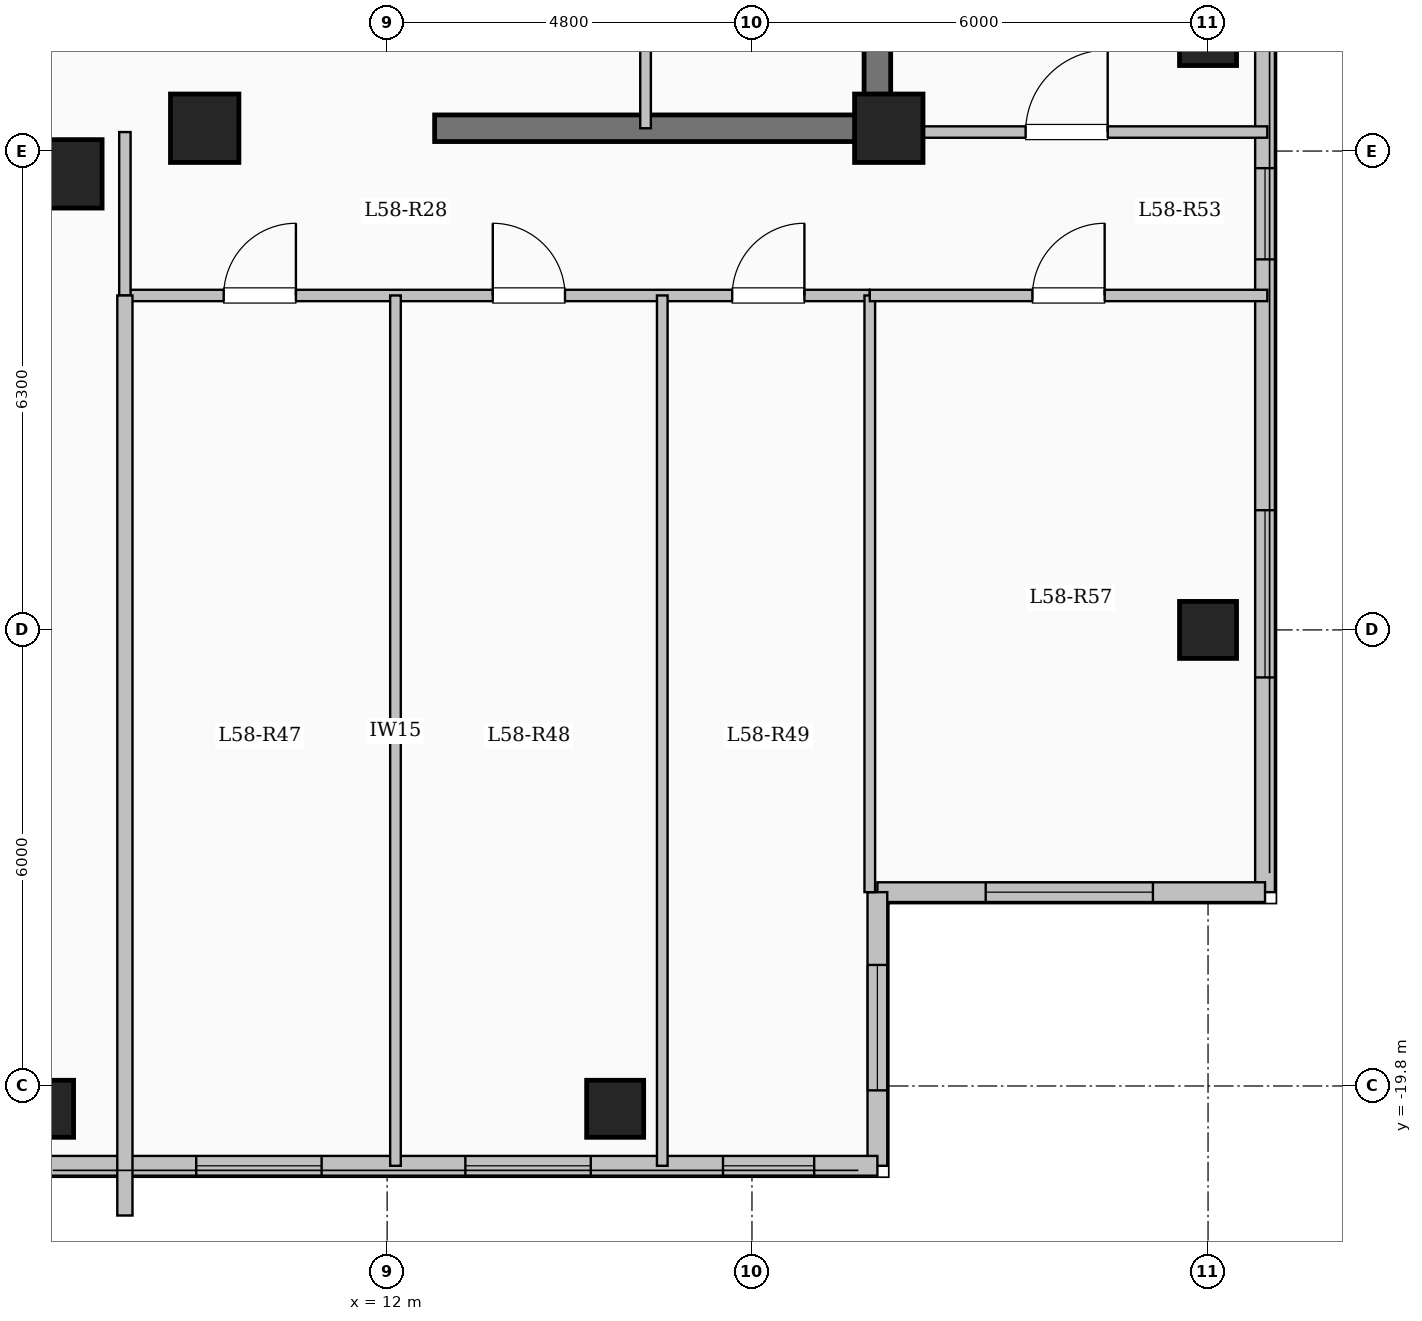
"""IFC4 building model, lengths in metres.
Left out: names, types, materials, properties, quantities, classifications, styles, units other than length and angle.
Written with IfcOpenShell. Run it as: python <this file> out.ifc"""

import sys

from ifc_helpers import new_model, si_unit, direction, frame, frame_2d, origin, origin_2d, place, context, subcontext, project, spatial, rectangle, extrude, element, fill, save


model = new_model("IFC4")
c1 = context("Model", 3, precision=1e-05, world=origin(), true_north=direction((0.0, 1.0)))
c2 = subcontext(c1, "Body", "Model", "MODEL_VIEW")
j1 = project(units=[si_unit("LENGTHUNIT", "METRE"), si_unit("PLANEANGLEUNIT", "RADIAN")], contexts=[c1])
p1 = place(None, origin())
s1 = spatial("IfcSite", under=j1, at=p1, CompositionType="ELEMENT")
p2 = place(p1, origin())
s2 = spatial("IfcBuilding", under=s1, at=p2, CompositionType="ELEMENT")
p3 = place(p2, frame((0.0, 0.0, 213.7)))
s3 = spatial("IfcBuildingStorey", under=s2, at=p3, CompositionType="ELEMENT", Elevation=213.7)
for number, where, z_axis, x_axis in (
    (1, (7.8, -7.8, 0.0), (0.0, 0.0, 1.0), (1.0, 0.0, 0.0)),
    (2, (9.6, -7.2, 0.0), (0.0, 0.0, 1.0), (1.0, 0.0, 0.0)),
    (3, (18.6, -7.2, 0.0), (0.0, 0.0, 1.0), (1.0, 0.0, 0.0)),
):
    element("IfcColumn", number, at=place(p3, frame(where, z_axis=z_axis, x_axis=x_axis)), inside=s3, PredefinedType="COLUMN", context=c2, shape_type="SweptSolid", body=[
        extrude(rectangle(XDim=0.9, YDim=0.9, at=origin_2d()), origin(), (0.0, 0.0, 1.0), 3.35),
    ])
for number, where, z_axis, x_axis in (
    (4, (7.5, -20.1, 0.0), (0.0, 0.0, 1.0), (1.0, 0.0, 0.0)),
    (5, (15.0, -20.1, 0.0), (0.0, 0.0, 1.0), (1.0, 0.0, 0.0)),
    (6, (22.8, -13.8, 0.0), (0.0, 0.0, 1.0), (1.0, 0.0, 0.0)),
    (7, (22.8, -6.0, 0.0), (0.0, 0.0, 1.0), (1.0, 0.0, 0.0)),
):
    element("IfcColumn", number, at=place(p3, frame(where, z_axis=z_axis, x_axis=x_axis)), inside=s3, PredefinedType="COLUMN", context=c2, shape_type="SweptSolid", body=[
        extrude(rectangle(XDim=0.75, YDim=0.75, at=origin_2d()), origin(), (0.0, 0.0, 1.0), 3.35),
    ])
p4 = place(p3, frame((23.55, 17.25, 0.0), z_axis=(0.0, 0.0, 1.0), x_axis=(0.0, -1.0, 0.0)))
e8 = element("IfcWall", 8, at=p4, inside=s3, PredefinedType="SOLIDWALL", context=c2, shape_type="SweptSolid", body=[
    extrude(rectangle(XDim=34.5, YDim=0.26, at=frame_2d((17.25, 0.0))), origin(), (0.0, 0.0, 1.0), 3.1),
])
p5 = place(p4, frame((1.375, 0.0, 0.9)))
e9 = element("IfcOpeningElement", 9, at=p5, cuts=e8, PredefinedType="OPENING", context=c2, shape_type="SweptSolid", body=[
    extrude(rectangle(XDim=2.0, YDim=1.7, at=frame_2d((1.0, 0.85))), frame((0.0, 0.14, 0.0), z_axis=(0.0, -1.0, 0.0), x_axis=(1.0, 0.0, 0.0)), (0.0, 0.0, 1.0), 0.28),
])
p6 = place(p4, frame((5.125, 0.0, 0.95)))
e10 = element("IfcOpeningElement", 10, at=p6, cuts=e8, PredefinedType="OPENING", context=c2, shape_type="SweptSolid", body=[
    extrude(rectangle(XDim=1.0, YDim=1.5, at=frame_2d((0.5, 0.75))), frame((0.0, 0.14, 0.0), z_axis=(0.0, -1.0, 0.0), x_axis=(1.0, 0.0, 0.0)), (0.0, 0.0, 1.0), 0.28),
])
p7 = place(p4, frame((14.5, 0.0, 0.9)))
e11 = element("IfcOpeningElement", 11, at=p7, cuts=e8, PredefinedType="OPENING", context=c2, shape_type="SweptSolid", body=[
    extrude(rectangle(XDim=2.0, YDim=1.7, at=frame_2d((1.0, 0.85))), frame((0.0, 0.14, 0.0), z_axis=(0.0, -1.0, 0.0), x_axis=(1.0, 0.0, 0.0)), (0.0, 0.0, 1.0), 0.28),
])
p8 = place(p4, frame((24.975, 0.0, 0.95)))
e12 = element("IfcOpeningElement", 12, at=p8, cuts=e8, PredefinedType="OPENING", context=c2, shape_type="SweptSolid", body=[
    extrude(rectangle(XDim=1.2, YDim=1.5, at=frame_2d((0.6, 0.75))), frame((0.0, 0.14, 0.0), z_axis=(0.0, -1.0, 0.0), x_axis=(1.0, 0.0, 0.0)), (0.0, 0.0, 1.0), 0.28),
])
p9 = place(p4, frame((29.475, 0.0, 0.9)))
e13 = element("IfcOpeningElement", 13, at=p9, cuts=e8, PredefinedType="OPENING", context=c2, shape_type="SweptSolid", body=[
    extrude(rectangle(XDim=2.2, YDim=1.75, at=frame_2d((1.1, 0.875))), frame((0.0, 0.14, 0.0), z_axis=(0.0, -1.0, 0.0), x_axis=(1.0, 0.0, 0.0)), (0.0, 0.0, 1.0), 0.28),
])
p10 = place(p3, frame((23.55, -17.25, 0.0), z_axis=(0.0, 0.0, 1.0), x_axis=(-1.0, 0.0, 0.0)))
e14 = element("IfcWall", 14, at=p10, inside=s3, PredefinedType="SOLIDWALL", context=c2, shape_type="SweptSolid", body=[
    extrude(rectangle(XDim=5.1, YDim=0.26, at=frame_2d((2.55, 0.0))), origin(), (0.0, 0.0, 1.0), 3.1),
])
p11 = place(p10, frame((1.475, 0.0, 0.9)))
e15 = element("IfcOpeningElement", 15, at=p11, cuts=e14, PredefinedType="OPENING", context=c2, shape_type="SweptSolid", body=[
    extrude(rectangle(XDim=2.2, YDim=1.75, at=frame_2d((1.1, 0.875))), frame((0.0, 0.14, 0.0), z_axis=(0.0, -1.0, 0.0), x_axis=(1.0, 0.0, 0.0)), (0.0, 0.0, 1.0), 0.28),
])
p12 = place(p3, frame((18.45, -17.25, 0.0), z_axis=(0.0, 0.0, 1.0), x_axis=(0.0, -1.0, 0.0)))
e16 = element("IfcWall", 16, at=p12, inside=s3, PredefinedType="SOLIDWALL", context=c2, shape_type="SweptSolid", body=[
    extrude(rectangle(XDim=3.6, YDim=0.26, at=frame_2d((1.8, 0.0))), origin(), (0.0, 0.0, 1.0), 3.1),
])
p13 = place(p12, frame((0.958, 0.0, 0.9)))
e17 = element("IfcOpeningElement", 17, at=p13, cuts=e16, PredefinedType="OPENING", context=c2, shape_type="SweptSolid", body=[
    extrude(rectangle(XDim=1.65, YDim=1.6, at=frame_2d((0.825, 0.8))), frame((0.0, 0.14, 0.0), z_axis=(0.0, -1.0, 0.0), x_axis=(1.0, 0.0, 0.0)), (0.0, 0.0, 1.0), 0.28),
])
p14 = place(p3, frame((18.45, -20.85, 0.0), z_axis=(0.0, 0.0, 1.0), x_axis=(-1.0, 0.0, 0.0)))
e18 = element("IfcWall", 18, at=p14, inside=s3, PredefinedType="SOLIDWALL", context=c2, shape_type="SweptSolid", body=[
    extrude(rectangle(XDim=11.1, YDim=0.26, at=frame_2d((5.55, 0.0))), origin(), (0.0, 0.0, 1.0), 3.1),
])
p15 = place(p14, frame((0.831, 0.0, 0.95)))
e19 = element("IfcOpeningElement", 19, at=p15, cuts=e18, PredefinedType="OPENING", context=c2, shape_type="SweptSolid", body=[
    extrude(rectangle(XDim=1.2, YDim=1.5, at=frame_2d((0.6, 0.75))), frame((0.0, 0.14, 0.0), z_axis=(0.0, -1.0, 0.0), x_axis=(1.0, 0.0, 0.0)), (0.0, 0.0, 1.0), 0.28),
])
p16 = place(p14, frame((3.771, 0.0, 0.9)))
e20 = element("IfcOpeningElement", 20, at=p16, cuts=e18, PredefinedType="OPENING", context=c2, shape_type="SweptSolid", body=[
    extrude(rectangle(XDim=1.65, YDim=1.6, at=frame_2d((0.825, 0.8))), frame((0.0, 0.14, 0.0), z_axis=(0.0, -1.0, 0.0), x_axis=(1.0, 0.0, 0.0)), (0.0, 0.0, 1.0), 0.28),
])
p17 = place(p14, frame((7.312, 0.0, 0.9)))
e21 = element("IfcOpeningElement", 21, at=p17, cuts=e18, PredefinedType="OPENING", context=c2, shape_type="SweptSolid", body=[
    extrude(rectangle(XDim=1.65, YDim=1.6, at=frame_2d((0.825, 0.8))), frame((0.0, 0.14, 0.0), z_axis=(0.0, -1.0, 0.0), x_axis=(1.0, 0.0, 0.0)), (0.0, 0.0, 1.0), 0.28),
])
p18 = place(p3, frame((18.45, -7.375, 0.0), z_axis=(0.0, 0.0, 1.0), x_axis=(0.0, 1.0, 0.0)))
e22 = element("IfcWall", 22, at=p18, inside=s3, PredefinedType="SHEAR", context=c2, shape_type="SweptSolid", body=[
    extrude(rectangle(XDim=14.05, YDim=0.35, at=frame_2d((7.025, 0.0))), origin(), (0.0, 0.0, 1.0), 3.35),
])
p19 = place(p3, frame((12.625, -7.2, 0.0), z_axis=(0.0, 0.0, 1.0), x_axis=(1.0, 0.0, 0.0)))
e23 = element("IfcWall", 23, at=p19, inside=s3, PredefinedType="SHEAR", context=c2, shape_type="SweptSolid", body=[
    extrude(rectangle(XDim=6.0, YDim=0.35, at=frame_2d((3.0, 0.0))), origin(), (0.0, 0.0, 1.0), 3.35),
])
p20 = place(p3, frame((15.4, -7.2, 0.0), z_axis=(0.0, 0.0, 1.0), x_axis=(0.0, 1.0, 0.0)))
e24 = element("IfcWall", 24, at=p20, inside=s3, PredefinedType="PARTITIONING", context=c2, shape_type="SweptSolid", body=[
    extrude(rectangle(XDim=10.45, YDim=0.14, at=frame_2d((5.225, 0.0))), origin(), (0.0, 0.0, 1.0), 3.1),
])
p21 = place(p20, frame((9.25, 0.0, 0.0)))
e25 = element("IfcOpeningElement", 25, at=p21, cuts=e24, PredefinedType="OPENING", context=c2, shape_type="SweptSolid", body=[
    extrude(rectangle(XDim=0.9, YDim=2.08, at=frame_2d((0.45, 1.04))), frame((0.0, 0.08, 0.0), z_axis=(0.0, -1.0, 0.0), x_axis=(1.0, 0.0, 0.0)), (0.0, 0.0, 1.0), 0.16),
])
p22 = place(p3, frame((8.55, -9.4, 0.0), z_axis=(0.0, 0.0, 1.0), x_axis=(1.0, 0.0, 0.0)))
e26 = element("IfcWall", 26, at=p22, inside=s3, PredefinedType="PARTITIONING", context=c2, shape_type="SweptSolid", body=[
    extrude(rectangle(XDim=9.8, YDim=0.15, at=frame_2d((4.9, 0.0))), origin(), (0.0, 0.0, 1.0), 3.1),
])
p23 = place(p22, frame((1.3, 0.0, 0.0)))
e27 = element("IfcOpeningElement", 27, at=p23, cuts=e26, PredefinedType="OPENING", context=c2, shape_type="SweptSolid", body=[
    extrude(rectangle(XDim=0.95, YDim=2.15, at=frame_2d((0.475, 1.075))), frame((0.0, 0.085, 0.0), z_axis=(0.0, -1.0, 0.0), x_axis=(1.0, 0.0, 0.0)), (0.0, 0.0, 1.0), 0.17),
])
p24 = place(p22, frame((4.84, 0.0, 0.0)))
e28 = element("IfcOpeningElement", 28, at=p24, cuts=e26, PredefinedType="OPENING", context=c2, shape_type="SweptSolid", body=[
    extrude(rectangle(XDim=0.95, YDim=2.15, at=frame_2d((0.475, 1.075))), frame((0.0, 0.085, 0.0), z_axis=(0.0, -1.0, 0.0), x_axis=(1.0, 0.0, 0.0)), (0.0, 0.0, 1.0), 0.17),
])
p25 = place(p22, frame((7.99, 0.0, 0.0)))
e29 = element("IfcOpeningElement", 29, at=p25, cuts=e26, PredefinedType="OPENING", context=c2, shape_type="SweptSolid", body=[
    extrude(rectangle(XDim=0.95, YDim=2.15, at=frame_2d((0.475, 1.075))), frame((0.0, 0.085, 0.0), z_axis=(0.0, -1.0, 0.0), x_axis=(1.0, 0.0, 0.0)), (0.0, 0.0, 1.0), 0.17),
])
p26 = place(p3, frame((8.55, -9.4, 0.0), z_axis=(0.0, 0.0, 1.0), x_axis=(0.0, 1.0, 0.0)))
e30 = element("IfcWall", 30, at=p26, inside=s3, PredefinedType="PARTITIONING", context=c2, shape_type="SweptSolid", body=[
    extrude(rectangle(XDim=2.15, YDim=0.15, at=frame_2d((1.075, 0.0))), origin(), (0.0, 0.0, 1.0), 3.1),
])
for number, where, z_axis, x_axis in (
    (31, (12.11, -20.85, 0.0), (0.0, 0.0, 1.0), (0.0, 1.0, 0.0)),
    (32, (15.62, -20.85, 0.0), (0.0, 0.0, 1.0), (0.0, 1.0, 0.0)),
):
    element("IfcWall", number, at=place(p3, frame(where, z_axis=z_axis, x_axis=x_axis)), inside=s3, PredefinedType="PARTITIONING", context=c2, shape_type="SweptSolid", body=[
        extrude(rectangle(XDim=11.45, YDim=0.14, at=frame_2d((5.725, 0.0))), origin(), (0.0, 0.0, 1.0), 3.1),
    ])
p27 = place(p3, frame((8.55, -21.504, 0.0), z_axis=(0.0, 0.0, 1.0), x_axis=(0.0, 1.0, 0.0)))
e33 = element("IfcWall", 33, at=p27, inside=s3, PredefinedType="SOLIDWALL", context=c2, shape_type="SweptSolid", body=[
    extrude(rectangle(XDim=12.104, YDim=0.2, at=frame_2d((6.052, 0.0))), origin(), (0.0, 0.0, 1.0), 3.1),
])
p28 = place(p3, frame((18.45, -7.25, 0.0), z_axis=(0.0, 0.0, 1.0), x_axis=(1.0, 0.0, 0.0)))
e34 = element("IfcWall", 34, at=p28, inside=s3, PredefinedType="PARTITIONING", context=c2, shape_type="SweptSolid", body=[
    extrude(rectangle(XDim=5.13, YDim=0.15, at=frame_2d((2.565, 0.0))), origin(), (0.0, 0.0, 1.0), 3.1),
])
p29 = place(p28, frame((1.95, 0.0, 0.0)))
e35 = element("IfcOpeningElement", 35, at=p29, cuts=e34, PredefinedType="OPENING", context=c2, shape_type="SweptSolid", body=[
    extrude(rectangle(XDim=1.08, YDim=2.15, at=frame_2d((0.54, 1.075))), frame((0.0, 0.085, 0.0), z_axis=(0.0, -1.0, 0.0), x_axis=(1.0, 0.0, 0.0)), (0.0, 0.0, 1.0), 0.17),
])
p30 = place(p3, frame((18.35, -17.25, 0.0), z_axis=(0.0, 0.0, 1.0), x_axis=(0.0, 1.0, 0.0)))
e36 = element("IfcWall", 36, at=p30, inside=s3, PredefinedType="PARTITIONING", context=c2, shape_type="SweptSolid", body=[
    extrude(rectangle(XDim=7.85, YDim=0.14, at=frame_2d((3.925, 0.0))), origin(), (0.0, 0.0, 1.0), 3.1),
])
p31 = place(p3, frame((18.35, -9.4, 0.0), z_axis=(0.0, 0.0, 1.0), x_axis=(1.0, 0.0, 0.0)))
e37 = element("IfcWall", 37, at=p31, inside=s3, PredefinedType="PARTITIONING", context=c2, shape_type="SweptSolid", body=[
    extrude(rectangle(XDim=5.23, YDim=0.15, at=frame_2d((2.615, 0.0))), origin(), (0.0, 0.0, 1.0), 3.1),
])
p32 = place(p31, frame((2.14, 0.0, 0.0)))
e38 = element("IfcOpeningElement", 38, at=p32, cuts=e37, PredefinedType="OPENING", context=c2, shape_type="SweptSolid", body=[
    extrude(rectangle(XDim=0.95, YDim=2.15, at=frame_2d((0.475, 1.075))), frame((0.0, 0.085, 0.0), z_axis=(0.0, -1.0, 0.0), x_axis=(1.0, 0.0, 0.0)), (0.0, 0.0, 1.0), 0.17),
])
p33 = place(p8, origin())
e39 = element("IfcWindow", 39, at=p33, inside=s3, PartitioningType="SINGLE_PANEL", PredefinedType="WINDOW", context=c2, shape_type="SweptSolid", body=[
    extrude(rectangle(XDim=1.2, YDim=1.5, at=frame_2d((0.6, 0.75))), frame((0.0, 0.03, 0.0), z_axis=(0.0, -1.0, 0.0), x_axis=(1.0, 0.0, 0.0)), (0.0, 0.0, 1.0), 0.06),
])
fill(e12, e39)
p34 = place(p9, origin())
e40 = element("IfcWindow", 40, at=p34, inside=s3, PartitioningType="SINGLE_PANEL", PredefinedType="WINDOW", context=c2, shape_type="SweptSolid", body=[
    extrude(rectangle(XDim=2.2, YDim=1.75, at=frame_2d((1.1, 0.875))), frame((0.0, 0.03, 0.0), z_axis=(0.0, -1.0, 0.0), x_axis=(1.0, 0.0, 0.0)), (0.0, 0.0, 1.0), 0.06),
])
fill(e13, e40)
p35 = place(p11, origin())
e41 = element("IfcWindow", 41, at=p35, inside=s3, PartitioningType="SINGLE_PANEL", PredefinedType="WINDOW", context=c2, shape_type="SweptSolid", body=[
    extrude(rectangle(XDim=2.2, YDim=1.75, at=frame_2d((1.1, 0.875))), frame((0.0, 0.03, 0.0), z_axis=(0.0, -1.0, 0.0), x_axis=(1.0, 0.0, 0.0)), (0.0, 0.0, 1.0), 0.06),
])
fill(e15, e41)
p36 = place(p13, origin())
e42 = element("IfcWindow", 42, at=p36, inside=s3, PartitioningType="SINGLE_PANEL", PredefinedType="WINDOW", context=c2, shape_type="SweptSolid", body=[
    extrude(rectangle(XDim=1.65, YDim=1.6, at=frame_2d((0.825, 0.8))), frame((0.0, 0.03, 0.0), z_axis=(0.0, -1.0, 0.0), x_axis=(1.0, 0.0, 0.0)), (0.0, 0.0, 1.0), 0.06),
])
fill(e17, e42)
p37 = place(p15, origin())
e43 = element("IfcWindow", 43, at=p37, inside=s3, PartitioningType="SINGLE_PANEL", PredefinedType="WINDOW", context=c2, shape_type="SweptSolid", body=[
    extrude(rectangle(XDim=1.2, YDim=1.5, at=frame_2d((0.6, 0.75))), frame((0.0, 0.03, 0.0), z_axis=(0.0, -1.0, 0.0), x_axis=(1.0, 0.0, 0.0)), (0.0, 0.0, 1.0), 0.06),
])
fill(e19, e43)
p38 = place(p16, origin())
e44 = element("IfcWindow", 44, at=p38, inside=s3, PartitioningType="SINGLE_PANEL", PredefinedType="WINDOW", context=c2, shape_type="SweptSolid", body=[
    extrude(rectangle(XDim=1.65, YDim=1.6, at=frame_2d((0.825, 0.8))), frame((0.0, 0.03, 0.0), z_axis=(0.0, -1.0, 0.0), x_axis=(1.0, 0.0, 0.0)), (0.0, 0.0, 1.0), 0.06),
])
fill(e20, e44)
p39 = place(p17, origin())
e45 = element("IfcWindow", 45, at=p39, inside=s3, PartitioningType="SINGLE_PANEL", PredefinedType="WINDOW", context=c2, shape_type="SweptSolid", body=[
    extrude(rectangle(XDim=1.65, YDim=1.6, at=frame_2d((0.825, 0.8))), frame((0.0, 0.03, 0.0), z_axis=(0.0, -1.0, 0.0), x_axis=(1.0, 0.0, 0.0)), (0.0, 0.0, 1.0), 0.06),
])
fill(e21, e45)
p40 = place(p23, origin())
e46 = element("IfcDoor", 46, at=p40, inside=s3, OperationType="SINGLE_SWING_RIGHT", PredefinedType="DOOR", context=c2, shape_type="SweptSolid", body=[
    extrude(rectangle(XDim=0.95, YDim=2.15, at=frame_2d((0.475, 1.075))), frame((0.0, 0.025, 0.0), z_axis=(0.0, -1.0, 0.0), x_axis=(1.0, 0.0, 0.0)), (0.0, 0.0, 1.0), 0.05),
])
fill(e27, e46)
p41 = place(p24, origin())
e47 = element("IfcDoor", 47, at=p41, inside=s3, OperationType="SINGLE_SWING_LEFT", PredefinedType="DOOR", context=c2, shape_type="SweptSolid", body=[
    extrude(rectangle(XDim=0.95, YDim=2.15, at=frame_2d((0.475, 1.075))), frame((0.0, 0.025, 0.0), z_axis=(0.0, -1.0, 0.0), x_axis=(1.0, 0.0, 0.0)), (0.0, 0.0, 1.0), 0.05),
])
fill(e28, e47)
p42 = place(p25, origin())
e48 = element("IfcDoor", 48, at=p42, inside=s3, OperationType="SINGLE_SWING_RIGHT", PredefinedType="DOOR", context=c2, shape_type="SweptSolid", body=[
    extrude(rectangle(XDim=0.95, YDim=2.15, at=frame_2d((0.475, 1.075))), frame((0.0, 0.025, 0.0), z_axis=(0.0, -1.0, 0.0), x_axis=(1.0, 0.0, 0.0)), (0.0, 0.0, 1.0), 0.05),
])
fill(e29, e48)
p43 = place(p32, origin())
e49 = element("IfcDoor", 49, at=p43, inside=s3, OperationType="SINGLE_SWING_RIGHT", PredefinedType="DOOR", context=c2, shape_type="SweptSolid", body=[
    extrude(rectangle(XDim=0.95, YDim=2.15, at=frame_2d((0.475, 1.075))), frame((0.0, 0.025, 0.0), z_axis=(0.0, -1.0, 0.0), x_axis=(1.0, 0.0, 0.0)), (0.0, 0.0, 1.0), 0.05),
])
fill(e38, e49)
p44 = place(p29, origin())
e50 = element("IfcDoor", 50, at=p44, inside=s3, OperationType="SINGLE_SWING_RIGHT", PredefinedType="DOOR", context=c2, shape_type="SweptSolid", body=[
    extrude(rectangle(XDim=1.08, YDim=2.15, at=frame_2d((0.54, 1.075))), frame((0.0, 0.025, 0.0), z_axis=(0.0, -1.0, 0.0), x_axis=(1.0, 0.0, 0.0)), (0.0, 0.0, 1.0), 0.05),
])
fill(e35, e50)
save(model, sys.argv[1])
